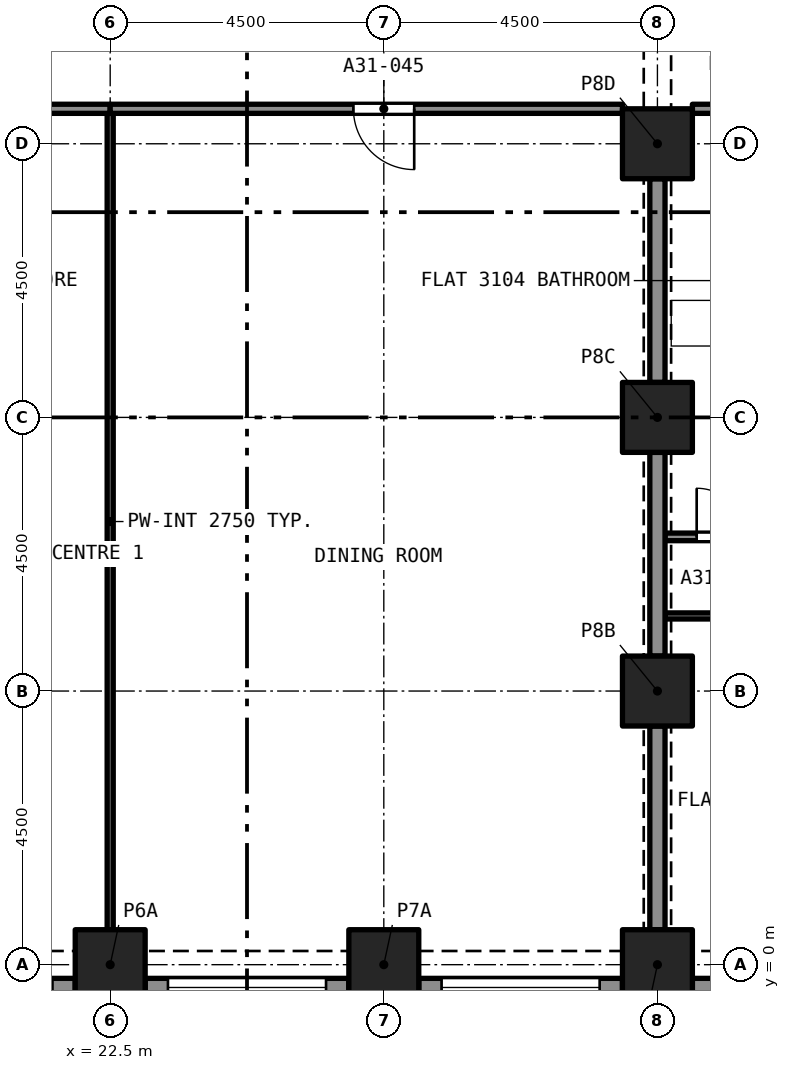
"""IFC4 building model, lengths in metres.
Left out: names, types, materials, properties, quantities, classifications, styles, units other than length and angle.
Written with IfcOpenShell. Run it as: python <this file> out.ifc"""

import sys

from ifc_helpers import new_model, si_unit, direction, frame, frame_2d, origin, origin_2d, place, context, subcontext, project, spatial, rectangle, extrude, element, fill, save


model = new_model("IFC4")
c1 = context("Model", 3, precision=1e-05, world=origin(), true_north=direction((0.0, 1.0)))
c2 = subcontext(c1, "Body", "Model", "MODEL_VIEW")
j1 = project(units=[si_unit("LENGTHUNIT", "METRE"), si_unit("PLANEANGLEUNIT", "RADIAN")], contexts=[c1])
p1 = place(None, origin())
s1 = spatial("IfcSite", under=j1, at=p1, CompositionType="ELEMENT")
p2 = place(p1, origin())
s2 = spatial("IfcBuilding", under=s1, at=p2, CompositionType="ELEMENT")
p3 = place(p2, frame((0.0, 0.0, 112.0)))
s3 = spatial("IfcBuildingStorey", under=s2, at=p3, CompositionType="ELEMENT", Elevation=112.0)
for number, where, z_axis, x_axis in (
    (1, (22.5, 0.0, 0.0), (0.0, 0.0, 1.0), (1.0, 0.0, 0.0)),
    (2, (27.0, 0.0, 0.0), (0.0, 0.0, 1.0), (1.0, 0.0, 0.0)),
    (3, (31.5, 0.0, 0.0), (0.0, 0.0, 1.0), (1.0, 0.0, 0.0)),
    (4, (31.5, 4.5, 0.0), (0.0, 0.0, 1.0), (1.0, 0.0, 0.0)),
    (5, (31.5, 9.0, 0.0), (0.0, 0.0, 1.0), (1.0, 0.0, 0.0)),
    (6, (31.5, 13.5, 0.0), (0.0, 0.0, 1.0), (1.0, 0.0, 0.0)),
):
    element("IfcColumn", number, at=place(p3, frame(where, z_axis=z_axis, x_axis=x_axis)), inside=s3, PredefinedType="COLUMN", context=c2, shape_type="SweptSolid", body=[
        extrude(rectangle(XDim=1.15, YDim=1.15, at=origin_2d()), origin(), (0.0, 0.0, 1.0), 3.2),
    ])
p4 = place(p3, frame((21.925, -0.375, 0.0), z_axis=(0.0, 0.0, 1.0), x_axis=(-1.0, 0.0, 0.0)))
e7 = element("IfcWall", 7, at=p4, inside=s3, PredefinedType="SOLIDWALL", context=c2, shape_type="SweptSolid", body=[
    extrude(rectangle(XDim=3.35, YDim=0.3, at=frame_2d((1.675, 0.0))), origin(), (0.0, 0.0, 1.0), 3.2),
])
p5 = place(p4, frame((0.375, 0.0, 0.45)))
e8 = element("IfcOpeningElement", 8, at=p5, cuts=e7, PredefinedType="OPENING", context=c2, shape_type="SweptSolid", body=[
    extrude(rectangle(XDim=2.6, YDim=1.95, at=frame_2d((1.3, 0.975))), frame((0.0, 0.16, 0.0), z_axis=(0.0, -1.0, 0.0), x_axis=(1.0, 0.0, 0.0)), (0.0, 0.0, 1.0), 0.32),
])
p6 = place(p3, frame((26.425, -0.375, 0.0), z_axis=(0.0, 0.0, 1.0), x_axis=(-1.0, 0.0, 0.0)))
e9 = element("IfcWall", 9, at=p6, inside=s3, PredefinedType="SOLIDWALL", context=c2, shape_type="SweptSolid", body=[
    extrude(rectangle(XDim=3.35, YDim=0.3, at=frame_2d((1.675, 0.0))), origin(), (0.0, 0.0, 1.0), 3.2),
])
p7 = place(p6, frame((0.375, 0.0, 0.45)))
e10 = element("IfcOpeningElement", 10, at=p7, cuts=e9, PredefinedType="OPENING", context=c2, shape_type="SweptSolid", body=[
    extrude(rectangle(XDim=2.6, YDim=1.95, at=frame_2d((1.3, 0.975))), frame((0.0, 0.16, 0.0), z_axis=(0.0, -1.0, 0.0), x_axis=(1.0, 0.0, 0.0)), (0.0, 0.0, 1.0), 0.32),
])
p8 = place(p3, frame((30.925, -0.375, 0.0), z_axis=(0.0, 0.0, 1.0), x_axis=(-1.0, 0.0, 0.0)))
e11 = element("IfcWall", 11, at=p8, inside=s3, PredefinedType="SOLIDWALL", context=c2, shape_type="SweptSolid", body=[
    extrude(rectangle(XDim=3.35, YDim=0.3, at=frame_2d((1.675, 0.0))), origin(), (0.0, 0.0, 1.0), 3.2),
])
p9 = place(p8, frame((0.375, 0.0, 0.45)))
e12 = element("IfcOpeningElement", 12, at=p9, cuts=e11, PredefinedType="OPENING", context=c2, shape_type="SweptSolid", body=[
    extrude(rectangle(XDim=2.6, YDim=1.95, at=frame_2d((1.3, 0.975))), frame((0.0, 0.16, 0.0), z_axis=(0.0, -1.0, 0.0), x_axis=(1.0, 0.0, 0.0)), (0.0, 0.0, 1.0), 0.32),
])
p10 = place(p3, frame((35.425, -0.375, 0.0), z_axis=(0.0, 0.0, 1.0), x_axis=(-1.0, 0.0, 0.0)))
e13 = element("IfcWall", 13, at=p10, inside=s3, PredefinedType="SOLIDWALL", context=c2, shape_type="SweptSolid", body=[
    extrude(rectangle(XDim=3.35, YDim=0.3, at=frame_2d((1.675, 0.0))), origin(), (0.0, 0.0, 1.0), 3.2),
])
p11 = place(p10, frame((0.375, 0.0, 0.45)))
e14 = element("IfcOpeningElement", 14, at=p11, cuts=e13, PredefinedType="OPENING", context=c2, shape_type="SweptSolid", body=[
    extrude(rectangle(XDim=2.6, YDim=1.95, at=frame_2d((1.3, 0.975))), frame((0.0, 0.16, 0.0), z_axis=(0.0, -1.0, 0.0), x_axis=(1.0, 0.0, 0.0)), (0.0, 0.0, 1.0), 0.32),
])
p12 = place(p3, frame((31.625, 7.035, 0.0), z_axis=(0.0, 0.0, 1.0), x_axis=(1.0, 0.0, 0.0)))
e15 = element("IfcWall", 15, at=p12, inside=s3, PredefinedType="PARTITIONING", context=c2, shape_type="SweptSolid", body=[
    extrude(rectangle(XDim=1.966, YDim=0.125, at=frame_2d((0.983, 0.0))), origin(), (0.0, 0.0, 1.0), 2.9),
])
p13 = place(p12, frame((0.521, 0.0, 0.0)))
e16 = element("IfcOpeningElement", 16, at=p13, cuts=e15, PredefinedType="OPENING", context=c2, shape_type="SweptSolid", body=[
    extrude(rectangle(XDim=0.8, YDim=2.1, at=frame_2d((0.4, 1.05))), frame((0.0, 0.073, 0.0), z_axis=(0.0, -1.0, 0.0), x_axis=(1.0, 0.0, 0.0)), (0.0, 0.0, 1.0), 0.145),
])
p14 = place(p3, frame((31.5, 9.575, 0.0), z_axis=(0.0, 0.0, 1.0), x_axis=(0.0, 1.0, 0.0)))
e17 = element("IfcWall", 17, at=p14, inside=s3, PredefinedType="PARTITIONING", context=c2, shape_type="SweptSolid", body=[
    extrude(rectangle(XDim=3.35, YDim=0.25, at=frame_2d((1.675, 0.0))), origin(), (0.0, 0.0, 1.0), 2.38),
])
p15 = place(p3, frame((32.075, 14.075, 0.0), z_axis=(0.0, 0.0, 1.0), x_axis=(1.0, 0.0, 0.0)))
e18 = element("IfcWall", 18, at=p15, inside=s3, PredefinedType="PARTITIONING", context=c2, shape_type="SweptSolid", body=[
    extrude(rectangle(XDim=3.175, YDim=0.15, at=frame_2d((1.587, 0.0))), origin(), (0.0, 0.0, 1.0), 2.9),
])
p16 = place(p3, frame((36.0, 5.735, 0.0), z_axis=(0.0, 0.0, 1.0), x_axis=(-1.0, 0.0, 0.0)))
e19 = element("IfcWall", 19, at=p16, inside=s3, PredefinedType="PARTITIONING", context=c2, shape_type="SweptSolid", body=[
    extrude(rectangle(XDim=4.375, YDim=0.1, at=frame_2d((2.188, 0.0))), origin(), (0.0, 0.0, 1.0), 2.9),
])
p17 = place(p16, frame((1.75, 0.0, 0.0)))
e20 = element("IfcOpeningElement", 20, at=p17, cuts=e19, PredefinedType="OPENING", context=c2, shape_type="SweptSolid", body=[
    extrude(rectangle(XDim=1.0, YDim=2.1, at=frame_2d((0.5, 1.05))), frame((0.0, 0.06, 0.0), z_axis=(0.0, -1.0, 0.0), x_axis=(1.0, 0.0, 0.0)), (0.0, 0.0, 1.0), 0.12),
])
for number, where, z_axis, x_axis in (
    (21, (31.5, 0.575, 0.0), (0.0, 0.0, 1.0), (0.0, 1.0, 0.0)),
    (22, (31.5, 5.075, 0.0), (0.0, 0.0, 1.0), (0.0, 1.0, 0.0)),
):
    element("IfcWall", number, at=place(p3, frame(where, z_axis=z_axis, x_axis=x_axis)), inside=s3, PredefinedType="PARTITIONING", context=c2, shape_type="SweptSolid", body=[
        extrude(rectangle(XDim=3.35, YDim=0.25, at=frame_2d((1.675, 0.0))), origin(), (0.0, 0.0, 1.0), 2.38),
    ])
p18 = place(p3, frame((22.5, 0.575, 0.0), z_axis=(0.0, 0.0, 1.0), x_axis=(0.0, 1.0, 0.0)))
e23 = element("IfcWall", 23, at=p18, inside=s3, PredefinedType="PARTITIONING", context=c2, shape_type="SweptSolid", body=[
    extrude(rectangle(XDim=13.425, YDim=0.1, at=frame_2d((6.712, 0.0))), origin(), (0.0, 0.0, 1.0), 2.75),
])
p19 = place(p3, frame((22.5, 14.075, 0.0), z_axis=(0.0, 0.0, 1.0), x_axis=(-1.0, 0.0, 0.0)))
e24 = element("IfcWall", 24, at=p19, inside=s3, PredefinedType="PARTITIONING", context=c2, shape_type="SweptSolid", body=[
    extrude(rectangle(XDim=3.925, YDim=0.15, at=frame_2d((1.962, 0.0))), origin(), (0.0, 0.0, 1.0), 2.75),
])
p20 = place(p19, frame((1.75, 0.0, 0.0)))
e25 = element("IfcOpeningElement", 25, at=p20, cuts=e24, PredefinedType="OPENING", context=c2, shape_type="SweptSolid", body=[
    extrude(rectangle(XDim=1.0, YDim=2.1, at=frame_2d((0.5, 1.05))), frame((0.0, 0.085, 0.0), z_axis=(0.0, -1.0, 0.0), x_axis=(1.0, 0.0, 0.0)), (0.0, 0.0, 1.0), 0.17),
])
p21 = place(p3, frame((30.925, 14.075, 0.0), z_axis=(0.0, 0.0, 1.0), x_axis=(-1.0, 0.0, 0.0)))
e26 = element("IfcWall", 26, at=p21, inside=s3, PredefinedType="PARTITIONING", context=c2, shape_type="SweptSolid", body=[
    extrude(rectangle(XDim=8.425, YDim=0.15, at=frame_2d((4.212, 0.0))), origin(), (0.0, 0.0, 1.0), 2.75),
])
p22 = place(p21, frame((3.425, 0.0, 0.0)))
e27 = element("IfcOpeningElement", 27, at=p22, cuts=e26, PredefinedType="OPENING", context=c2, shape_type="SweptSolid", body=[
    extrude(rectangle(XDim=1.0, YDim=2.1, at=frame_2d((0.5, 1.05))), frame((0.0, 0.085, 0.0), z_axis=(0.0, -1.0, 0.0), x_axis=(1.0, 0.0, 0.0)), (0.0, 0.0, 1.0), 0.17),
])
p23 = place(p7, origin())
e28 = element("IfcWindow", 28, at=p23, inside=s3, PartitioningType="SINGLE_PANEL", PredefinedType="WINDOW", context=c2, shape_type="SweptSolid", body=[
    extrude(rectangle(XDim=2.6, YDim=1.95, at=frame_2d((1.3, 0.975))), frame((0.0, 0.03, 0.0), z_axis=(0.0, -1.0, 0.0), x_axis=(1.0, 0.0, 0.0)), (0.0, 0.0, 1.0), 0.06),
])
fill(e10, e28)
p24 = place(p9, origin())
e29 = element("IfcWindow", 29, at=p24, inside=s3, PartitioningType="SINGLE_PANEL", PredefinedType="WINDOW", context=c2, shape_type="SweptSolid", body=[
    extrude(rectangle(XDim=2.6, YDim=1.95, at=frame_2d((1.3, 0.975))), frame((0.0, 0.03, 0.0), z_axis=(0.0, -1.0, 0.0), x_axis=(1.0, 0.0, 0.0)), (0.0, 0.0, 1.0), 0.06),
])
fill(e12, e29)
p25 = place(p13, origin())
e30 = element("IfcDoor", 30, at=p25, inside=s3, OperationType="SINGLE_SWING_LEFT", PredefinedType="DOOR", context=c2, shape_type="SweptSolid", body=[
    extrude(rectangle(XDim=0.8, YDim=2.1, at=frame_2d((0.4, 1.05))), frame((0.0, 0.025, 0.0), z_axis=(0.0, -1.0, 0.0), x_axis=(1.0, 0.0, 0.0)), (0.0, 0.0, 1.0), 0.05),
])
fill(e16, e30)
p26 = place(p22, origin())
e31 = element("IfcDoor", 31, at=p26, inside=s3, OperationType="SINGLE_SWING_LEFT", PredefinedType="DOOR", context=c2, shape_type="SweptSolid", body=[
    extrude(rectangle(XDim=1.0, YDim=2.1, at=frame_2d((0.5, 1.05))), frame((0.0, 0.025, 0.0), z_axis=(0.0, -1.0, 0.0), x_axis=(1.0, 0.0, 0.0)), (0.0, 0.0, 1.0), 0.05),
])
fill(e27, e31)
save(model, sys.argv[1])
